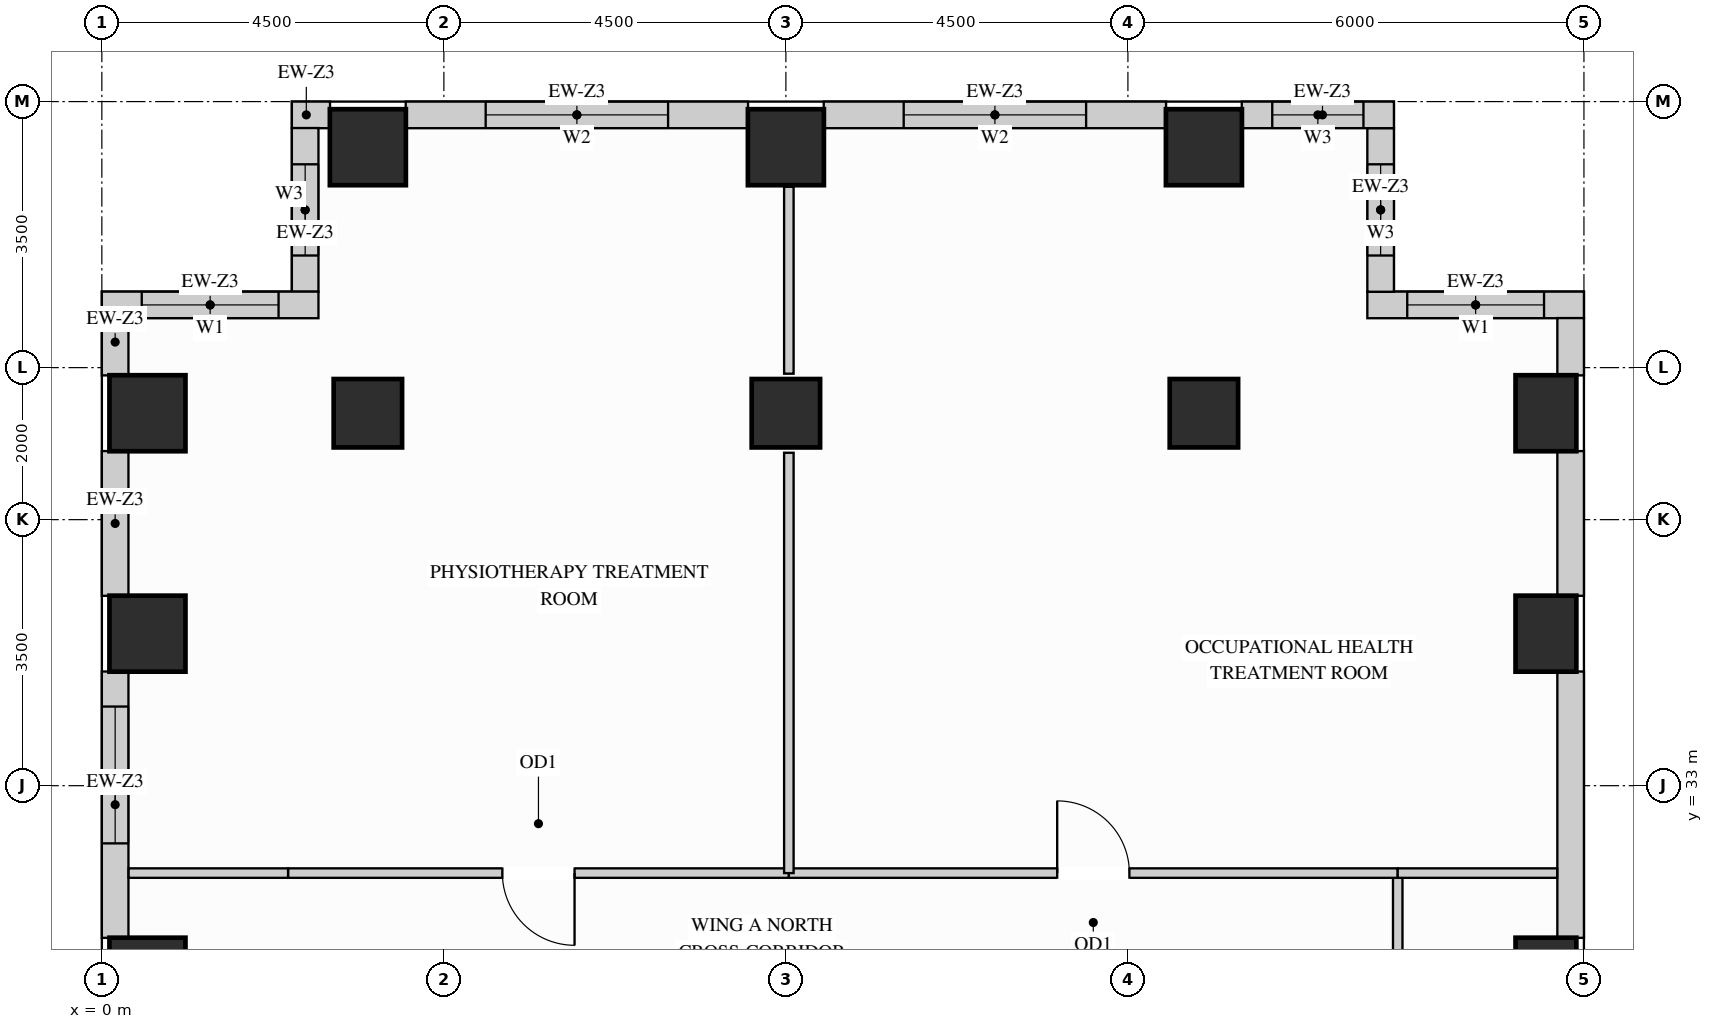
"""IFC4 building model, lengths in metres.
Left out: names, types, materials, properties, quantities, classifications, styles, units other than length and angle.
Written with IfcOpenShell. Run it as: python <this file> out.ifc"""

import sys

from ifc_helpers import new_model, si_unit, direction, frame, frame_2d, origin, origin_2d, place, context, subcontext, project, spatial, rectangle, extrude, source, transform, mapped, element, fill, save


model = new_model("IFC4")
c1 = context("Model", 3, precision=1e-05, world=origin(), true_north=direction((0.0, 1.0)))
c2 = subcontext(c1, "Body", "Model", "MODEL_VIEW")
j1 = project(units=[si_unit("LENGTHUNIT", "METRE"), si_unit("PLANEANGLEUNIT", "RADIAN")], contexts=[c1])
p1 = place(None, origin())
s1 = spatial("IfcSite", under=j1, at=p1, CompositionType="ELEMENT")
p2 = place(p1, origin())
s2 = spatial("IfcBuilding", under=s1, at=p2, CompositionType="ELEMENT")
p3 = place(p2, frame((0.0, 0.0, 182.7)))
s3 = spatial("IfcBuildingStorey", under=s2, at=p3, CompositionType="ELEMENT", Elevation=182.7)
m1 = source(origin(), c2, "Body", "SweptSolid", [
    extrude(rectangle(XDim=0.9, YDim=0.9, at=origin_2d()), origin(), (0.0, 0.0, 1.0), 3.4),
])
for number, where, z_axis, x_axis in (
    (1, (14.5, 37.9, 0.0), (0.0, 0.0, 1.0), (1.0, 0.0, 0.0)),
    (2, (3.5, 37.9, 0.0), (0.0, 0.0, 1.0), (1.0, 0.0, 0.0)),
    (3, (9.0, 37.9, 0.0), (0.0, 0.0, 1.0), (1.0, 0.0, 0.0)),
):
    element("IfcColumn", number, at=place(p3, frame(where, z_axis=z_axis, x_axis=x_axis)), inside=s3, PredefinedType="COLUMN", context=c2, shape_type="MappedRepresentation", body=[
        mapped(m1, transform((0.0, 0.0, 0.0), x_axis=(1.0, 0.0, 0.0), y_axis=(0.0, 1.0, 0.0), z_axis=(0.0, 0.0, 1.0))),
    ])
m2 = source(origin(), c2, "Body", "SweptSolid", [
    extrude(rectangle(XDim=0.8, YDim=1.0, at=origin_2d()), origin(), (0.0, 0.0, 1.0), 3.4),
])
for number, where, z_axis, x_axis in (
    (4, (19.0, 30.5, 0.0), (0.0, 0.0, 1.0), (1.0, 0.0, 0.0)),
    (5, (19.0, 35.0, 0.0), (0.0, 0.0, 1.0), (1.0, 0.0, 0.0)),
    (6, (19.0, 37.9, 0.0), (0.0, 0.0, 1.0), (1.0, 0.0, 0.0)),
):
    element("IfcColumn", number, at=place(p3, frame(where, z_axis=z_axis, x_axis=x_axis)), inside=s3, PredefinedType="COLUMN", context=c2, shape_type="MappedRepresentation", body=[
        mapped(m2, transform((0.0, 0.0, 0.0), x_axis=(1.0, 0.0, 0.0), y_axis=(0.0, 1.0, 0.0), z_axis=(0.0, 0.0, 1.0))),
    ])
m3 = source(origin(), c2, "Body", "SweptSolid", [
    extrude(rectangle(XDim=1.0, YDim=1.0, at=origin_2d()), origin(), (0.0, 0.0, 1.0), 3.4),
])
for number, where, z_axis, x_axis in (
    (7, (14.5, 41.4, 0.0), (0.0, 0.0, 1.0), (1.0, 0.0, 0.0)),
    (8, (3.5, 41.4, 0.0), (0.0, 0.0, 1.0), (1.0, 0.0, 0.0)),
    (9, (9.0, 41.4, 0.0), (0.0, 0.0, 1.0), (1.0, 0.0, 0.0)),
    (10, (0.6, 30.5, 0.0), (0.0, 0.0, 1.0), (1.0, 0.0, 0.0)),
    (11, (0.6, 35.0, 0.0), (0.0, 0.0, 1.0), (1.0, 0.0, 0.0)),
    (12, (0.6, 37.9, 0.0), (0.0, 0.0, 1.0), (1.0, 0.0, 0.0)),
):
    element("IfcColumn", number, at=place(p3, frame(where, z_axis=z_axis, x_axis=x_axis)), inside=s3, PredefinedType="COLUMN", context=c2, shape_type="MappedRepresentation", body=[
        mapped(m3, transform((0.0, 0.0, 0.0), x_axis=(1.0, 0.0, 0.0), y_axis=(0.0, 1.0, 0.0), z_axis=(0.0, 0.0, 1.0))),
    ])
p4 = place(p3, frame((19.5, 39.325, 0.0), z_axis=(0.0, 0.0, 1.0), x_axis=(-1.0, 0.0, 0.0)))
e13 = element("IfcWall", 13, at=p4, inside=s3, PredefinedType="SOLIDWALL", context=c2, shape_type="SweptSolid", body=[
    extrude(rectangle(XDim=2.85, YDim=0.35, at=frame_2d((1.425, 0.0))), origin(), (0.0, 0.0, 1.0), 3.385),
])
p5 = place(p4, frame((0.525, 0.0, 0.78)))
e14 = element("IfcOpeningElement", 14, at=p5, cuts=e13, PredefinedType="OPENING", context=c2, shape_type="SweptSolid", body=[
    extrude(rectangle(XDim=1.8, YDim=2.1, at=frame_2d((0.9, 1.05))), frame((0.0, 0.185, 0.0), z_axis=(0.0, -1.0, 0.0), x_axis=(1.0, 0.0, 0.0)), (0.0, 0.0, 1.0), 0.37),
])
p6 = place(p3, frame((16.825, 39.498, 0.0), z_axis=(0.0, 0.0, 1.0), x_axis=(0.0, 1.0, 0.0)))
e15 = element("IfcWall", 15, at=p6, inside=s3, PredefinedType="SOLIDWALL", context=c2, shape_type="SweptSolid", body=[
    extrude(rectangle(XDim=2.154, YDim=0.35, at=frame_2d((1.077, 0.0))), origin(), (0.0, 0.0, 1.0), 3.385),
])
p7 = place(p6, frame((0.477, 0.0, 0.78)))
e16 = element("IfcOpeningElement", 16, at=p7, cuts=e15, PredefinedType="OPENING", context=c2, shape_type="SweptSolid", body=[
    extrude(rectangle(XDim=1.2, YDim=2.1, at=frame_2d((0.6, 1.05))), frame((0.0, 0.185, 0.0), z_axis=(0.0, -1.0, 0.0), x_axis=(1.0, 0.0, 0.0)), (0.0, 0.0, 1.0), 0.37),
])
p8 = place(p3, frame((17.0, 41.825, 0.0), z_axis=(0.0, 0.0, 1.0), x_axis=(-1.0, 0.0, 0.0)))
e17 = element("IfcWall", 17, at=p8, inside=s3, PredefinedType="SOLIDWALL", context=c2, shape_type="SweptSolid", body=[
    extrude(rectangle(XDim=2.002, YDim=0.35, at=frame_2d((1.001, 0.0))), origin(), (0.0, 0.0, 1.0), 3.385),
])
p9 = place(p8, frame((0.401, 0.0, 0.78)))
e18 = element("IfcOpeningElement", 18, at=p9, cuts=e17, PredefinedType="OPENING", context=c2, shape_type="SweptSolid", body=[
    extrude(rectangle(XDim=1.2, YDim=2.1, at=frame_2d((0.6, 1.05))), frame((0.0, 0.185, 0.0), z_axis=(0.0, -1.0, 0.0), x_axis=(1.0, 0.0, 0.0)), (0.0, 0.0, 1.0), 0.37),
])
p10 = place(p3, frame((14.002, 41.825, 0.0), z_axis=(0.0, 0.0, 1.0), x_axis=(-1.0, 0.0, 0.0)))
e19 = element("IfcWall", 19, at=p10, inside=s3, PredefinedType="SOLIDWALL", context=c2, shape_type="SweptSolid", body=[
    extrude(rectangle(XDim=4.504, YDim=0.35, at=frame_2d((2.252, 0.0))), origin(), (0.0, 0.0, 1.0), 2.612),
])
p11 = place(p10, frame((1.052, 0.0, 0.78)))
e20 = element("IfcOpeningElement", 20, at=p11, cuts=e19, PredefinedType="OPENING", context=c2, shape_type="SweptSolid", body=[
    extrude(rectangle(XDim=2.4, YDim=1.652, at=frame_2d((1.2, 0.826))), frame((0.0, 0.185, 0.0), z_axis=(0.0, -1.0, 0.0), x_axis=(1.0, 0.0, 0.0)), (0.0, 0.0, 1.0), 0.37),
])
p12 = place(p3, frame((8.502, 41.825, 0.0), z_axis=(0.0, 0.0, 1.0), x_axis=(-1.0, 0.0, 0.0)))
e21 = element("IfcWall", 21, at=p12, inside=s3, PredefinedType="SOLIDWALL", context=c2, shape_type="SweptSolid", body=[
    extrude(rectangle(XDim=4.504, YDim=0.35, at=frame_2d((2.252, 0.0))), origin(), (0.0, 0.0, 1.0), 2.612),
])
p13 = place(p12, frame((1.052, 0.0, 0.78)))
e22 = element("IfcOpeningElement", 22, at=p13, cuts=e21, PredefinedType="OPENING", context=c2, shape_type="SweptSolid", body=[
    extrude(rectangle(XDim=2.4, YDim=1.652, at=frame_2d((1.2, 0.826))), frame((0.0, 0.185, 0.0), z_axis=(0.0, -1.0, 0.0), x_axis=(1.0, 0.0, 0.0)), (0.0, 0.0, 1.0), 0.37),
])
m4 = source(origin(), c2, "Body", "SweptSolid", [
    extrude(rectangle(XDim=0.502, YDim=0.35, at=frame_2d((0.251, 0.0))), origin(), (0.0, 0.0, 1.0), 3.385),
])
p14 = place(p3, frame((3.002, 41.825, 0.0), z_axis=(0.0, 0.0, 1.0), x_axis=(-1.0, 0.0, 0.0)))
e23 = element("IfcWall", 23, at=p14, inside=s3, PredefinedType="SOLIDWALL", context=c2, shape_type="MappedRepresentation", body=[
    mapped(m4, transform((0.0, 0.0, 0.0), x_axis=(1.0, 0.0, 0.0), y_axis=(0.0, 1.0, 0.0), z_axis=(0.0, 0.0, 1.0))),
])
p15 = place(p3, frame((2.675, 41.652, 0.0), z_axis=(0.0, 0.0, 1.0), x_axis=(0.0, -1.0, 0.0)))
e24 = element("IfcWall", 24, at=p15, inside=s3, PredefinedType="SOLIDWALL", context=c2, shape_type="SweptSolid", body=[
    extrude(rectangle(XDim=2.154, YDim=0.35, at=frame_2d((1.077, 0.0))), origin(), (0.0, 0.0, 1.0), 3.385),
])
p16 = place(p15, frame((0.477, 0.0, 0.78)))
e25 = element("IfcOpeningElement", 25, at=p16, cuts=e24, PredefinedType="OPENING", context=c2, shape_type="SweptSolid", body=[
    extrude(rectangle(XDim=1.2, YDim=2.1, at=frame_2d((0.6, 1.05))), frame((0.0, 0.185, 0.0), z_axis=(0.0, -1.0, 0.0), x_axis=(1.0, 0.0, 0.0)), (0.0, 0.0, 1.0), 0.37),
])
p17 = place(p3, frame((2.85, 39.325, 0.0), z_axis=(0.0, 0.0, 1.0), x_axis=(-1.0, 0.0, 0.0)))
e26 = element("IfcWall", 26, at=p17, inside=s3, PredefinedType="SOLIDWALL", context=c2, shape_type="SweptSolid", body=[
    extrude(rectangle(XDim=2.85, YDim=0.35, at=frame_2d((1.425, 0.0))), origin(), (0.0, 0.0, 1.0), 3.385),
])
p18 = place(p17, frame((0.525, 0.0, 0.78)))
e27 = element("IfcOpeningElement", 27, at=p18, cuts=e26, PredefinedType="OPENING", context=c2, shape_type="SweptSolid", body=[
    extrude(rectangle(XDim=1.8, YDim=2.1, at=frame_2d((0.9, 1.05))), frame((0.0, 0.185, 0.0), z_axis=(0.0, -1.0, 0.0), x_axis=(1.0, 0.0, 0.0)), (0.0, 0.0, 1.0), 0.37),
])
m5 = source(origin(), c2, "Body", "SweptSolid", [
    extrude(rectangle(XDim=0.754, YDim=0.35, at=frame_2d((0.377, 0.0))), origin(), (0.0, 0.0, 1.0), 3.385),
])
p19 = place(p3, frame((0.175, 39.152, 0.0), z_axis=(0.0, 0.0, 1.0), x_axis=(0.0, -1.0, 0.0)))
e28 = element("IfcWall", 28, at=p19, inside=s3, PredefinedType="SOLIDWALL", context=c2, shape_type="MappedRepresentation", body=[
    mapped(m5, transform((0.0, 0.0, 0.0), x_axis=(1.0, 0.0, 0.0), y_axis=(0.0, 1.0, 0.0), z_axis=(0.0, 0.0, 1.0))),
])
m6 = source(origin(), c2, "Body", "SweptSolid", [
    extrude(rectangle(XDim=1.904, YDim=0.35, at=frame_2d((0.952, 0.0))), origin(), (0.0, 0.0, 1.0), 2.612),
])
p20 = place(p3, frame((0.175, 37.402, 0.0), z_axis=(0.0, 0.0, 1.0), x_axis=(0.0, -1.0, 0.0)))
e29 = element("IfcWall", 29, at=p20, inside=s3, PredefinedType="SOLIDWALL", context=c2, shape_type="MappedRepresentation", body=[
    mapped(m6, transform((0.0, 0.0, 0.0), x_axis=(1.0, 0.0, 0.0), y_axis=(0.0, 1.0, 0.0), z_axis=(0.0, 0.0, 1.0))),
])
p21 = place(p3, frame((0.175, 34.502, 0.0), z_axis=(0.0, 0.0, 1.0), x_axis=(0.0, -1.0, 0.0)))
e30 = element("IfcWall", 30, at=p21, inside=s3, PredefinedType="SOLIDWALL", context=c2, shape_type="SweptSolid", body=[
    extrude(rectangle(XDim=3.504, YDim=0.35, at=frame_2d((1.752, 0.0))), origin(), (0.0, 0.0, 1.0), 2.612),
])
p22 = place(p21, frame((0.461, 0.0, 0.78)))
e31 = element("IfcOpeningElement", 31, at=p22, cuts=e30, PredefinedType="OPENING", context=c2, shape_type="SweptSolid", body=[
    extrude(rectangle(XDim=1.8, YDim=1.652, at=frame_2d((0.9, 0.826))), frame((0.0, 0.185, 0.0), z_axis=(0.0, -1.0, 0.0), x_axis=(1.0, 0.0, 0.0)), (0.0, 0.0, 1.0), 0.37),
])
m7 = source(origin(), c2, "Body", "SweptSolid", [
    extrude(rectangle(XDim=3.504, YDim=0.35, at=frame_2d((1.752, 0.0))), origin(), (0.0, 0.0, 1.0), 2.612),
])
p23 = place(p3, frame((19.325, 30.998, 0.0), z_axis=(0.0, 0.0, 1.0), x_axis=(0.0, 1.0, 0.0)))
e32 = element("IfcWall", 32, at=p23, inside=s3, PredefinedType="SOLIDWALL", context=c2, shape_type="MappedRepresentation", body=[
    mapped(m7, transform((0.0, 0.0, 0.0), x_axis=(1.0, 0.0, 0.0), y_axis=(0.0, 1.0, 0.0), z_axis=(0.0, 0.0, 1.0))),
])
p24 = place(p3, frame((19.325, 35.498, 0.0), z_axis=(0.0, 0.0, 1.0), x_axis=(0.0, 1.0, 0.0)))
e33 = element("IfcWall", 33, at=p24, inside=s3, PredefinedType="SOLIDWALL", context=c2, shape_type="MappedRepresentation", body=[
    mapped(m6, transform((0.0, 0.0, 0.0), x_axis=(1.0, 0.0, 0.0), y_axis=(0.0, 1.0, 0.0), z_axis=(0.0, 0.0, 1.0))),
])
p25 = place(p3, frame((19.325, 38.398, 0.0), z_axis=(0.0, 0.0, 1.0), x_axis=(0.0, 1.0, 0.0)))
e34 = element("IfcWall", 34, at=p25, inside=s3, PredefinedType="SOLIDWALL", context=c2, shape_type="MappedRepresentation", body=[
    mapped(m5, transform((0.0, 0.0, 0.0), x_axis=(1.0, 0.0, 0.0), y_axis=(0.0, 1.0, 0.0), z_axis=(0.0, 0.0, 1.0))),
])
p26 = place(p3, frame((17.05, 26.05, 0.0), z_axis=(0.0, 0.0, 1.0), x_axis=(0.0, 1.0, 0.0)))
e35 = element("IfcWall", 35, at=p26, inside=s3, PredefinedType="PARTITIONING", context=c2, shape_type="SweptSolid", body=[
    extrude(rectangle(XDim=5.8, YDim=0.125, at=frame_2d((2.9, 0.0))), origin(), (0.0, 0.0, 1.0), 3.385),
])
p27 = place(p26, frame((2.425, 0.0, 0.0)))
e36 = element("IfcOpeningElement", 36, at=p27, cuts=e35, PredefinedType="OPENING", context=c2, shape_type="SweptSolid", body=[
    extrude(rectangle(XDim=0.95, YDim=2.15, at=frame_2d((0.475, 1.075))), frame((0.0, 0.073, 0.0), z_axis=(0.0, -1.0, 0.0), x_axis=(1.0, 0.0, 0.0)), (0.0, 0.0, 1.0), 0.145),
])
p28 = place(p3, frame((2.45, 31.85, 0.0), z_axis=(0.0, 0.0, 1.0), x_axis=(1.0, 0.0, 0.0)))
e37 = element("IfcWall", 37, at=p28, inside=s3, PredefinedType="PARTITIONING", context=c2, shape_type="SweptSolid", body=[
    extrude(rectangle(XDim=6.589, YDim=0.125, at=frame_2d((3.294, 0.0))), origin(), (0.0, 0.0, 1.0), 2.848),
])
p29 = place(p28, frame((2.82, 0.0, 0.0)))
e38 = element("IfcOpeningElement", 38, at=p29, cuts=e37, PredefinedType="OPENING", context=c2, shape_type="SweptSolid", body=[
    extrude(rectangle(XDim=0.95, YDim=2.15, at=frame_2d((0.475, 1.075))), frame((0.0, 0.073, 0.0), z_axis=(0.0, -1.0, 0.0), x_axis=(1.0, 0.0, 0.0)), (0.0, 0.0, 1.0), 0.145),
])
p30 = place(p3, frame((9.039, 31.85, 0.0), z_axis=(0.0, 0.0, 1.0), x_axis=(1.0, 0.0, 0.0)))
e39 = element("IfcWall", 39, at=p30, inside=s3, PredefinedType="PARTITIONING", context=c2, shape_type="SweptSolid", body=[
    extrude(rectangle(XDim=8.011, YDim=0.125, at=frame_2d((4.005, 0.0))), origin(), (0.0, 0.0, 1.0), 2.848),
])
p31 = place(p30, frame((3.531, 0.0, 0.0)))
e40 = element("IfcOpeningElement", 40, at=p31, cuts=e39, PredefinedType="OPENING", context=c2, shape_type="SweptSolid", body=[
    extrude(rectangle(XDim=0.95, YDim=2.15, at=frame_2d((0.475, 1.075))), frame((0.0, 0.073, 0.0), z_axis=(0.0, -1.0, 0.0), x_axis=(1.0, 0.0, 0.0)), (0.0, 0.0, 1.0), 0.145),
])
m8 = source(origin(), c2, "Body", "SweptSolid", [
    extrude(rectangle(XDim=2.098, YDim=0.125, at=frame_2d((1.049, 0.0))), origin(), (0.0, 0.0, 1.0), 2.848),
])
for number, where, z_axis, x_axis in (
    (41, (17.05, 31.85, 0.0), (0.0, 0.0, 1.0), (1.0, 0.0, 0.0)),
    (42, (0.352, 31.85, 0.0), (0.0, 0.0, 1.0), (1.0, 0.0, 0.0)),
):
    element("IfcWall", number, at=place(p3, frame(where, z_axis=z_axis, x_axis=x_axis)), inside=s3, PredefinedType="PARTITIONING", context=c2, shape_type="MappedRepresentation", body=[
        mapped(m8, transform((0.0, 0.0, 0.0), x_axis=(1.0, 0.0, 0.0), y_axis=(0.0, 1.0, 0.0), z_axis=(0.0, 0.0, 1.0))),
    ])
m9 = source(origin(), c2, "Body", "SweptSolid", [
    extrude(rectangle(XDim=5.53, YDim=0.125, at=frame_2d((2.765, 0.0))), origin(), (0.0, 0.0, 1.0), 3.385),
])
p32 = place(p3, frame((9.039, 31.85, 0.0), z_axis=(0.0, 0.0, 1.0), x_axis=(0.0, 1.0, 0.0)))
e43 = element("IfcWall", 43, at=p32, inside=s3, PredefinedType="PARTITIONING", context=c2, shape_type="MappedRepresentation", body=[
    mapped(m9, transform((0.0, 0.0, 0.0), x_axis=(1.0, 0.0, 0.0), y_axis=(0.0, 1.0, 0.0), z_axis=(0.0, 0.0, 1.0))),
])
m10 = source(origin(), c2, "Body", "SweptSolid", [
    extrude(rectangle(XDim=2.46, YDim=0.125, at=frame_2d((1.23, 0.0))), origin(), (0.0, 0.0, 1.0), 2.773),
])
p33 = place(p3, frame((9.039, 38.42, 0.0), z_axis=(0.0, 0.0, 1.0), x_axis=(0.0, 1.0, 0.0)))
e44 = element("IfcWall", 44, at=p33, inside=s3, PredefinedType="PARTITIONING", context=c2, shape_type="MappedRepresentation", body=[
    mapped(m10, transform((0.0, 0.0, 0.0), x_axis=(1.0, 0.0, 0.0), y_axis=(0.0, 1.0, 0.0), z_axis=(0.0, 0.0, 1.0))),
])
m11 = source(origin(), c2, "Body", "SweptSolid", [
    extrude(rectangle(XDim=0.95, YDim=2.15, at=frame_2d((0.475, 1.075))), frame((0.0, 0.025, 0.0), z_axis=(0.0, -1.0, 0.0), x_axis=(1.0, 0.0, 0.0)), (0.0, 0.0, 1.0), 0.05),
])
p34 = place(p29, origin())
e45 = element("IfcDoor", 45, at=p34, inside=s3, OperationType="SINGLE_SWING_RIGHT", PredefinedType="DOOR", context=c2, shape_type="MappedRepresentation", body=[
    mapped(m11, transform((0.0, 0.0, 0.0), x_axis=(1.0, 0.0, 0.0), y_axis=(0.0, 1.0, 0.0), z_axis=(0.0, 0.0, 1.0))),
])
fill(e38, e45)
p35 = place(p31, origin())
e46 = element("IfcDoor", 46, at=p35, inside=s3, OperationType="SINGLE_SWING_LEFT", PredefinedType="DOOR", context=c2, shape_type="MappedRepresentation", body=[
    mapped(m11, transform((0.0, 0.0, 0.0), x_axis=(1.0, 0.0, 0.0), y_axis=(0.0, 1.0, 0.0), z_axis=(0.0, 0.0, 1.0))),
])
fill(e40, e46)
m12 = source(origin(), c2, "Body", "SweptSolid", [
    extrude(rectangle(XDim=1.8, YDim=2.1, at=frame_2d((0.9, 1.05))), frame((0.0, 0.03, 0.0), z_axis=(0.0, -1.0, 0.0), x_axis=(1.0, 0.0, 0.0)), (0.0, 0.0, 1.0), 0.06),
])
p36 = place(p5, origin())
e47 = element("IfcWindow", 47, at=p36, inside=s3, PartitioningType="SINGLE_PANEL", PredefinedType="WINDOW", context=c2, shape_type="MappedRepresentation", body=[
    mapped(m12, transform((0.0, 0.0, 0.0), x_axis=(1.0, 0.0, 0.0), y_axis=(0.0, 1.0, 0.0), z_axis=(0.0, 0.0, 1.0))),
])
fill(e14, e47)
p37 = place(p18, origin())
e48 = element("IfcWindow", 48, at=p37, inside=s3, PartitioningType="SINGLE_PANEL", PredefinedType="WINDOW", context=c2, shape_type="MappedRepresentation", body=[
    mapped(m12, transform((0.0, 0.0, 0.0), x_axis=(1.0, 0.0, 0.0), y_axis=(0.0, 1.0, 0.0), z_axis=(0.0, 0.0, 1.0))),
])
fill(e27, e48)
m13 = source(origin(), c2, "Body", "SweptSolid", [
    extrude(rectangle(XDim=1.8, YDim=1.652, at=frame_2d((0.9, 0.826))), frame((0.0, 0.03, 0.0), z_axis=(0.0, -1.0, 0.0), x_axis=(1.0, 0.0, 0.0)), (0.0, 0.0, 1.0), 0.06),
])
p38 = place(p22, origin())
e49 = element("IfcWindow", 49, at=p38, inside=s3, PartitioningType="SINGLE_PANEL", PredefinedType="WINDOW", context=c2, shape_type="MappedRepresentation", body=[
    mapped(m13, transform((0.0, 0.0, 0.0), x_axis=(1.0, 0.0, 0.0), y_axis=(0.0, 1.0, 0.0), z_axis=(0.0, 0.0, 1.0))),
])
fill(e31, e49)
m14 = source(origin(), c2, "Body", "SweptSolid", [
    extrude(rectangle(XDim=2.4, YDim=1.652, at=frame_2d((1.2, 0.826))), frame((0.0, 0.03, 0.0), z_axis=(0.0, -1.0, 0.0), x_axis=(1.0, 0.0, 0.0)), (0.0, 0.0, 1.0), 0.06),
])
p39 = place(p11, origin())
e50 = element("IfcWindow", 50, at=p39, inside=s3, PartitioningType="SINGLE_PANEL", PredefinedType="WINDOW", context=c2, shape_type="MappedRepresentation", body=[
    mapped(m14, transform((0.0, 0.0, 0.0), x_axis=(1.0, 0.0, 0.0), y_axis=(0.0, 1.0, 0.0), z_axis=(0.0, 0.0, 1.0))),
])
fill(e20, e50)
p40 = place(p13, origin())
e51 = element("IfcWindow", 51, at=p40, inside=s3, PartitioningType="SINGLE_PANEL", PredefinedType="WINDOW", context=c2, shape_type="MappedRepresentation", body=[
    mapped(m14, transform((0.0, 0.0, 0.0), x_axis=(1.0, 0.0, 0.0), y_axis=(0.0, 1.0, 0.0), z_axis=(0.0, 0.0, 1.0))),
])
fill(e22, e51)
m15 = source(origin(), c2, "Body", "SweptSolid", [
    extrude(rectangle(XDim=1.2, YDim=2.1, at=frame_2d((0.6, 1.05))), frame((0.0, 0.03, 0.0), z_axis=(0.0, -1.0, 0.0), x_axis=(1.0, 0.0, 0.0)), (0.0, 0.0, 1.0), 0.06),
])
p41 = place(p7, origin())
e52 = element("IfcWindow", 52, at=p41, inside=s3, PartitioningType="SINGLE_PANEL", PredefinedType="WINDOW", context=c2, shape_type="MappedRepresentation", body=[
    mapped(m15, transform((0.0, 0.0, 0.0), x_axis=(1.0, 0.0, 0.0), y_axis=(0.0, 1.0, 0.0), z_axis=(0.0, 0.0, 1.0))),
])
fill(e16, e52)
p42 = place(p9, origin())
e53 = element("IfcWindow", 53, at=p42, inside=s3, PartitioningType="SINGLE_PANEL", PredefinedType="WINDOW", context=c2, shape_type="MappedRepresentation", body=[
    mapped(m15, transform((0.0, 0.0, 0.0), x_axis=(1.0, 0.0, 0.0), y_axis=(0.0, 1.0, 0.0), z_axis=(0.0, 0.0, 1.0))),
])
fill(e18, e53)
p43 = place(p16, origin())
e54 = element("IfcWindow", 54, at=p43, inside=s3, PartitioningType="SINGLE_PANEL", PredefinedType="WINDOW", context=c2, shape_type="MappedRepresentation", body=[
    mapped(m15, transform((0.0, 0.0, 0.0), x_axis=(1.0, 0.0, 0.0), y_axis=(0.0, 1.0, 0.0), z_axis=(0.0, 0.0, 1.0))),
])
fill(e25, e54)
save(model, sys.argv[1])
